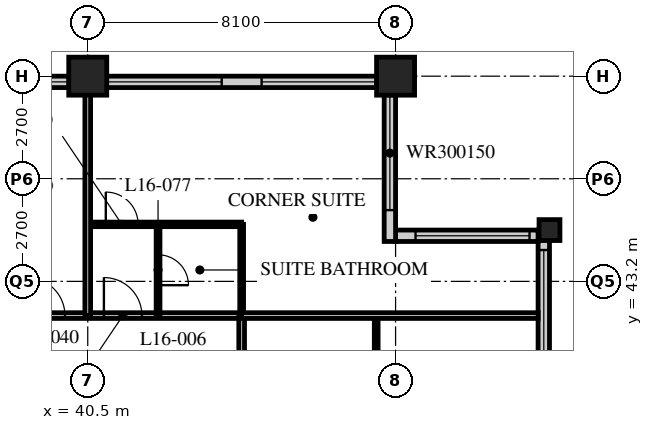
"""IFC4 building model, lengths in metres.
Left out: names, types, materials, properties, quantities, classifications, styles, units other than length and angle.
Written with IfcOpenShell. Run it as: python <this file> out.ifc"""

import sys

from ifc_helpers import new_model, si_unit, direction, frame, frame_2d, origin, origin_2d, place, context, subcontext, project, spatial, rectangle, hollow_rectangle, extrude, element, fill, save


model = new_model("IFC4")
c1 = context("Model", 3, precision=1e-05, world=origin(), true_north=direction((0.0, 1.0)))
c2 = subcontext(c1, "Body", "Model", "MODEL_VIEW")
j1 = project(units=[si_unit("LENGTHUNIT", "METRE"), si_unit("PLANEANGLEUNIT", "RADIAN")], contexts=[c1])
p1 = place(None, origin())
s1 = spatial("IfcSite", under=j1, at=p1, CompositionType="ELEMENT")
p2 = place(p1, origin())
s2 = spatial("IfcBuilding", under=s1, at=p2, CompositionType="ELEMENT")
p3 = place(p2, frame((0.0, 0.0, 67.0)))
s3 = spatial("IfcBuildingStorey", under=s2, at=p3, CompositionType="ELEMENT", Elevation=67.0)
for number, where, z_axis, x_axis in (
    (1, (40.5, 48.6, 0.0), (0.0, 0.0, 1.0), (1.0, 0.0, 0.0)),
    (2, (48.6, 48.6, 0.0), (0.0, 0.0, 1.0), (1.0, 0.0, 0.0)),
):
    element("IfcColumn", number, at=place(p3, frame(where, z_axis=z_axis, x_axis=x_axis)), inside=s3, PredefinedType="COLUMN", context=c2, shape_type="SweptSolid", body=[
        extrude(hollow_rectangle(XDim=1.0, YDim=1.0, WallThickness=0.1, at=origin_2d()), origin(), (0.0, 0.0, 1.0), 3.4),
    ])
p4 = place(p3, frame((52.65, 44.55, 0.0), z_axis=(0.0, 0.0, 1.0), x_axis=(1.0, 0.0, 0.0)))
e3 = element("IfcColumn", 3, at=p4, inside=s3, PredefinedType="COLUMN", context=c2, shape_type="SweptSolid", body=[
    extrude(hollow_rectangle(XDim=0.55, YDim=0.55, WallThickness=0.05, at=origin_2d()), origin(), (0.0, 0.0, 1.0), 3.4),
])
p5 = place(p3, frame((52.5, 40.2, 0.0), z_axis=(0.0, 0.0, 1.0), x_axis=(0.0, 1.0, 0.0)))
e4 = element("IfcWall", 4, at=p5, inside=s3, PredefinedType="SOLIDWALL", context=c2, shape_type="SweptSolid", body=[
    extrude(rectangle(XDim=4.35, YDim=0.3, at=frame_2d((2.175, 0.0))), origin(), (0.0, 0.0, 1.0), 3.19),
])
p6 = place(p5, frame((0.825, 0.0, 0.9)))
e5 = element("IfcOpeningElement", 5, at=p6, cuts=e4, PredefinedType="OPENING", context=c2, shape_type="SweptSolid", body=[
    extrude(rectangle(XDim=3.0, YDim=1.5, at=frame_2d((1.5, 0.75))), frame((0.0, 0.16, 0.0), z_axis=(0.0, -1.0, 0.0), x_axis=(1.0, 0.0, 0.0)), (0.0, 0.0, 1.0), 0.32),
])
p7 = place(p3, frame((52.35, 44.4, 0.0), z_axis=(0.0, 0.0, 1.0), x_axis=(-1.0, 0.0, 0.0)))
e6 = element("IfcWall", 6, at=p7, inside=s3, PredefinedType="SOLIDWALL", context=c2, shape_type="SweptSolid", body=[
    extrude(rectangle(XDim=3.75, YDim=0.3, at=frame_2d((1.875, 0.0))), origin(), (0.0, 0.0, 1.0), 3.19),
])
p8 = place(p7, frame((0.225, 0.0, 0.9)))
e7 = element("IfcOpeningElement", 7, at=p8, cuts=e6, PredefinedType="OPENING", context=c2, shape_type="SweptSolid", body=[
    extrude(rectangle(XDim=3.0, YDim=1.5, at=frame_2d((1.5, 0.75))), frame((0.0, 0.16, 0.0), z_axis=(0.0, -1.0, 0.0), x_axis=(1.0, 0.0, 0.0)), (0.0, 0.0, 1.0), 0.32),
])
p9 = place(p3, frame((48.45, 44.25, 0.0), z_axis=(0.0, 0.0, 1.0), x_axis=(0.0, 1.0, 0.0)))
e8 = element("IfcWall", 8, at=p9, inside=s3, PredefinedType="SOLIDWALL", context=c2, shape_type="SweptSolid", body=[
    extrude(rectangle(XDim=4.35, YDim=0.3, at=frame_2d((2.175, 0.0))), origin(), (0.0, 0.0, 1.0), 3.19),
])
p10 = place(p9, frame((0.825, 0.0, 0.9)))
e9 = element("IfcOpeningElement", 9, at=p10, cuts=e8, PredefinedType="OPENING", context=c2, shape_type="SweptSolid", body=[
    extrude(rectangle(XDim=3.0, YDim=1.5, at=frame_2d((1.5, 0.75))), frame((0.0, 0.16, 0.0), z_axis=(0.0, -1.0, 0.0), x_axis=(1.0, 0.0, 0.0)), (0.0, 0.0, 1.0), 0.32),
])
p11 = place(p3, frame((48.3, 48.45, 0.0), z_axis=(0.0, 0.0, 1.0), x_axis=(-1.0, 0.0, 0.0)))
e10 = element("IfcWall", 10, at=p11, inside=s3, PredefinedType="SOLIDWALL", context=c2, shape_type="SweptSolid", body=[
    extrude(rectangle(XDim=40.2, YDim=0.3, at=frame_2d((20.1, 0.0))), origin(), (0.0, 0.0, 1.0), 3.19),
])
p12 = place(p11, frame((0.225, 0.0, 0.9)))
e11 = element("IfcOpeningElement", 11, at=p12, cuts=e10, PredefinedType="OPENING", context=c2, shape_type="SweptSolid", body=[
    extrude(rectangle(XDim=3.0, YDim=2.0, at=frame_2d((1.5, 1.0))), frame((0.0, 0.16, 0.0), z_axis=(0.0, -1.0, 0.0), x_axis=(1.0, 0.0, 0.0)), (0.0, 0.0, 1.0), 0.32),
])
p13 = place(p11, frame((4.275, 0.0, 0.9)))
e12 = element("IfcOpeningElement", 12, at=p13, cuts=e10, PredefinedType="OPENING", context=c2, shape_type="SweptSolid", body=[
    extrude(rectangle(XDim=3.0, YDim=2.0, at=frame_2d((1.5, 1.0))), frame((0.0, 0.16, 0.0), z_axis=(0.0, -1.0, 0.0), x_axis=(1.0, 0.0, 0.0)), (0.0, 0.0, 1.0), 0.32),
])
p14 = place(p11, frame((8.325, 0.0, 0.9)))
e13 = element("IfcOpeningElement", 13, at=p14, cuts=e10, PredefinedType="OPENING", context=c2, shape_type="SweptSolid", body=[
    extrude(rectangle(XDim=3.0, YDim=2.0, at=frame_2d((1.5, 1.0))), frame((0.0, 0.16, 0.0), z_axis=(0.0, -1.0, 0.0), x_axis=(1.0, 0.0, 0.0)), (0.0, 0.0, 1.0), 0.32),
])
p15 = place(p11, frame((12.375, 0.0, 0.9)))
e14 = element("IfcOpeningElement", 14, at=p15, cuts=e10, PredefinedType="OPENING", context=c2, shape_type="SweptSolid", body=[
    extrude(rectangle(XDim=3.0, YDim=2.0, at=frame_2d((1.5, 1.0))), frame((0.0, 0.16, 0.0), z_axis=(0.0, -1.0, 0.0), x_axis=(1.0, 0.0, 0.0)), (0.0, 0.0, 1.0), 0.32),
])
p16 = place(p11, frame((16.425, 0.0, 0.9)))
e15 = element("IfcOpeningElement", 15, at=p16, cuts=e10, PredefinedType="OPENING", context=c2, shape_type="SweptSolid", body=[
    extrude(rectangle(XDim=3.0, YDim=2.0, at=frame_2d((1.5, 1.0))), frame((0.0, 0.16, 0.0), z_axis=(0.0, -1.0, 0.0), x_axis=(1.0, 0.0, 0.0)), (0.0, 0.0, 1.0), 0.32),
])
p17 = place(p11, frame((20.475, 0.0, 0.9)))
e16 = element("IfcOpeningElement", 16, at=p17, cuts=e10, PredefinedType="OPENING", context=c2, shape_type="SweptSolid", body=[
    extrude(rectangle(XDim=3.0, YDim=2.0, at=frame_2d((1.5, 1.0))), frame((0.0, 0.16, 0.0), z_axis=(0.0, -1.0, 0.0), x_axis=(1.0, 0.0, 0.0)), (0.0, 0.0, 1.0), 0.32),
])
p18 = place(p11, frame((24.525, 0.0, 0.9)))
e17 = element("IfcOpeningElement", 17, at=p18, cuts=e10, PredefinedType="OPENING", context=c2, shape_type="SweptSolid", body=[
    extrude(rectangle(XDim=3.0, YDim=2.0, at=frame_2d((1.5, 1.0))), frame((0.0, 0.16, 0.0), z_axis=(0.0, -1.0, 0.0), x_axis=(1.0, 0.0, 0.0)), (0.0, 0.0, 1.0), 0.32),
])
p19 = place(p11, frame((28.575, 0.0, 0.9)))
e18 = element("IfcOpeningElement", 18, at=p19, cuts=e10, PredefinedType="OPENING", context=c2, shape_type="SweptSolid", body=[
    extrude(rectangle(XDim=3.0, YDim=2.0, at=frame_2d((1.5, 1.0))), frame((0.0, 0.16, 0.0), z_axis=(0.0, -1.0, 0.0), x_axis=(1.0, 0.0, 0.0)), (0.0, 0.0, 1.0), 0.32),
])
p20 = place(p11, frame((32.625, 0.0, 0.9)))
e19 = element("IfcOpeningElement", 19, at=p20, cuts=e10, PredefinedType="OPENING", context=c2, shape_type="SweptSolid", body=[
    extrude(rectangle(XDim=3.0, YDim=2.0, at=frame_2d((1.5, 1.0))), frame((0.0, 0.16, 0.0), z_axis=(0.0, -1.0, 0.0), x_axis=(1.0, 0.0, 0.0)), (0.0, 0.0, 1.0), 0.32),
])
p21 = place(p11, frame((36.675, 0.0, 0.9)))
e20 = element("IfcOpeningElement", 20, at=p21, cuts=e10, PredefinedType="OPENING", context=c2, shape_type="SweptSolid", body=[
    extrude(rectangle(XDim=3.0, YDim=2.0, at=frame_2d((1.5, 1.0))), frame((0.0, 0.16, 0.0), z_axis=(0.0, -1.0, 0.0), x_axis=(1.0, 0.0, 0.0)), (0.0, 0.0, 1.0), 0.32),
])
p22 = place(p3, frame((8.1, 42.3, 0.0), z_axis=(0.0, 0.0, 1.0), x_axis=(1.0, 0.0, 0.0)))
e21 = element("IfcWall", 21, at=p22, inside=s3, PredefinedType="PARTITIONING", context=c2, shape_type="SweptSolid", body=[
    extrude(rectangle(XDim=36.45, YDim=0.15, at=frame_2d((18.225, 0.0))), origin(), (0.0, 0.0, 1.0), 3.19),
])
p23 = place(p22, frame((9.5, 0.0, 0.0)))
e22 = element("IfcOpeningElement", 22, at=p23, cuts=e21, PredefinedType="OPENING", context=c2, shape_type="SweptSolid", body=[
    extrude(rectangle(XDim=1.0, YDim=2.1, at=frame_2d((0.5, 1.05))), frame((0.0, 0.085, 0.0), z_axis=(0.0, -1.0, 0.0), x_axis=(1.0, 0.0, 0.0)), (0.0, 0.0, 1.0), 0.17),
])
p24 = place(p22, frame((14.6, 0.0, 0.0)))
e23 = element("IfcOpeningElement", 23, at=p24, cuts=e21, PredefinedType="OPENING", context=c2, shape_type="SweptSolid", body=[
    extrude(rectangle(XDim=1.0, YDim=2.1, at=frame_2d((0.5, 1.05))), frame((0.0, 0.085, 0.0), z_axis=(0.0, -1.0, 0.0), x_axis=(1.0, 0.0, 0.0)), (0.0, 0.0, 1.0), 0.17),
])
p25 = place(p22, frame((18.65, 0.0, 0.0)))
e24 = element("IfcOpeningElement", 24, at=p25, cuts=e21, PredefinedType="OPENING", context=c2, shape_type="SweptSolid", body=[
    extrude(rectangle(XDim=1.0, YDim=2.1, at=frame_2d((0.5, 1.05))), frame((0.0, 0.085, 0.0), z_axis=(0.0, -1.0, 0.0), x_axis=(1.0, 0.0, 0.0)), (0.0, 0.0, 1.0), 0.17),
])
p26 = place(p22, frame((25.7, 0.0, 0.0)))
e25 = element("IfcOpeningElement", 25, at=p26, cuts=e21, PredefinedType="OPENING", context=c2, shape_type="SweptSolid", body=[
    extrude(rectangle(XDim=1.0, YDim=2.1, at=frame_2d((0.5, 1.05))), frame((0.0, 0.085, 0.0), z_axis=(0.0, -1.0, 0.0), x_axis=(1.0, 0.0, 0.0)), (0.0, 0.0, 1.0), 0.17),
])
p27 = place(p22, frame((30.8, 0.0, 0.0)))
e26 = element("IfcOpeningElement", 26, at=p27, cuts=e21, PredefinedType="OPENING", context=c2, shape_type="SweptSolid", body=[
    extrude(rectangle(XDim=1.0, YDim=2.1, at=frame_2d((0.5, 1.05))), frame((0.0, 0.085, 0.0), z_axis=(0.0, -1.0, 0.0), x_axis=(1.0, 0.0, 0.0)), (0.0, 0.0, 1.0), 0.17),
])
p28 = place(p22, frame((32.825, 0.0, 0.0)))
e27 = element("IfcOpeningElement", 27, at=p28, cuts=e21, PredefinedType="OPENING", context=c2, shape_type="SweptSolid", body=[
    extrude(rectangle(XDim=1.0, YDim=2.1, at=frame_2d((0.5, 1.05))), frame((0.0, 0.085, 0.0), z_axis=(0.0, -1.0, 0.0), x_axis=(1.0, 0.0, 0.0)), (0.0, 0.0, 1.0), 0.17),
])
p29 = place(p22, frame((2.625, 0.0, 0.0)))
e28 = element("IfcOpeningElement", 28, at=p29, cuts=e21, PredefinedType="OPENING", context=c2, shape_type="SweptSolid", body=[
    extrude(rectangle(XDim=1.0, YDim=2.1, at=frame_2d((0.5, 1.05))), frame((0.0, 0.085, 0.0), z_axis=(0.0, -1.0, 0.0), x_axis=(1.0, 0.0, 0.0)), (0.0, 0.0, 1.0), 0.17),
])
p30 = place(p3, frame((44.55, 12.15, 0.0), z_axis=(0.0, 0.0, 1.0), x_axis=(0.0, 1.0, 0.0)))
e29 = element("IfcWall", 29, at=p30, inside=s3, PredefinedType="PARTITIONING", context=c2, shape_type="SweptSolid", body=[
    extrude(rectangle(XDim=30.15, YDim=0.15, at=frame_2d((15.075, 0.0))), origin(), (0.0, 0.0, 1.0), 3.19),
])
p31 = place(p30, frame((2.45, 0.0, 0.0)))
e30 = element("IfcOpeningElement", 30, at=p31, cuts=e29, PredefinedType="OPENING", context=c2, shape_type="SweptSolid", body=[
    extrude(rectangle(XDim=1.0, YDim=2.1, at=frame_2d((0.5, 1.05))), frame((0.0, 0.085, 0.0), z_axis=(0.0, -1.0, 0.0), x_axis=(1.0, 0.0, 0.0)), (0.0, 0.0, 1.0), 0.17),
])
p32 = place(p30, frame((4.35, 0.0, 0.0)))
e31 = element("IfcOpeningElement", 31, at=p32, cuts=e29, PredefinedType="OPENING", context=c2, shape_type="SweptSolid", body=[
    extrude(rectangle(XDim=1.0, YDim=2.1, at=frame_2d((0.5, 1.05))), frame((0.0, 0.085, 0.0), z_axis=(0.0, -1.0, 0.0), x_axis=(1.0, 0.0, 0.0)), (0.0, 0.0, 1.0), 0.17),
])
p33 = place(p30, frame((8.4, 0.0, 0.0)))
e32 = element("IfcOpeningElement", 32, at=p33, cuts=e29, PredefinedType="OPENING", context=c2, shape_type="SweptSolid", body=[
    extrude(rectangle(XDim=1.0, YDim=2.1, at=frame_2d((0.5, 1.05))), frame((0.0, 0.085, 0.0), z_axis=(0.0, -1.0, 0.0), x_axis=(1.0, 0.0, 0.0)), (0.0, 0.0, 1.0), 0.17),
])
p34 = place(p30, frame((14.6, 0.0, 0.0)))
e33 = element("IfcOpeningElement", 33, at=p34, cuts=e29, PredefinedType="OPENING", context=c2, shape_type="SweptSolid", body=[
    extrude(rectangle(XDim=1.0, YDim=2.1, at=frame_2d((0.5, 1.05))), frame((0.0, 0.085, 0.0), z_axis=(0.0, -1.0, 0.0), x_axis=(1.0, 0.0, 0.0)), (0.0, 0.0, 1.0), 0.17),
])
p35 = place(p30, frame((21.65, 0.0, 0.0)))
e34 = element("IfcOpeningElement", 34, at=p35, cuts=e29, PredefinedType="OPENING", context=c2, shape_type="SweptSolid", body=[
    extrude(rectangle(XDim=1.0, YDim=2.1, at=frame_2d((0.5, 1.05))), frame((0.0, 0.085, 0.0), z_axis=(0.0, -1.0, 0.0), x_axis=(1.0, 0.0, 0.0)), (0.0, 0.0, 1.0), 0.17),
])
p36 = place(p30, frame((26.7, 0.0, 0.0)))
e35 = element("IfcOpeningElement", 35, at=p36, cuts=e29, PredefinedType="OPENING", context=c2, shape_type="SweptSolid", body=[
    extrude(rectangle(XDim=1.0, YDim=2.1, at=frame_2d((0.5, 1.05))), frame((0.0, 0.085, 0.0), z_axis=(0.0, -1.0, 0.0), x_axis=(1.0, 0.0, 0.0)), (0.0, 0.0, 1.0), 0.17),
])
p37 = place(p3, frame((48.09, 40.0, 0.0), z_axis=(0.0, 0.0, 1.0), x_axis=(0.0, 1.0, 0.0)))
e36 = element("IfcWall", 36, at=p37, inside=s3, PredefinedType="PARTITIONING", context=c2, shape_type="SweptSolid", body=[
    extrude(rectangle(XDim=2.3, YDim=0.1, at=frame_2d((1.15, 0.0))), origin(), (0.0, 0.0, 1.0), 3.19),
])
p38 = place(p3, frame((40.5, 44.7, 0.0), z_axis=(0.0, 0.0, 1.0), x_axis=(1.0, 0.0, 0.0)))
e37 = element("IfcWall", 37, at=p38, inside=s3, PredefinedType="PARTITIONING", context=c2, shape_type="SweptSolid", body=[
    extrude(rectangle(XDim=4.05, YDim=0.12, at=frame_2d((2.025, 0.0))), origin(), (0.0, 0.0, 1.0), 3.19),
])
p39 = place(p38, frame((0.475, 0.0, 0.0)))
e38 = element("IfcOpeningElement", 38, at=p39, cuts=e37, PredefinedType="OPENING", context=c2, shape_type="SweptSolid", body=[
    extrude(rectangle(XDim=0.85, YDim=2.1, at=frame_2d((0.425, 1.05))), frame((0.0, 0.07, 0.0), z_axis=(0.0, -1.0, 0.0), x_axis=(1.0, 0.0, 0.0)), (0.0, 0.0, 1.0), 0.14),
])
p40 = place(p3, frame((42.35, 42.3, 0.0), z_axis=(0.0, 0.0, 1.0), x_axis=(0.0, 1.0, 0.0)))
e39 = element("IfcWall", 39, at=p40, inside=s3, PredefinedType="PARTITIONING", context=c2, shape_type="SweptSolid", body=[
    extrude(rectangle(XDim=2.4, YDim=0.1, at=frame_2d((1.2, 0.0))), origin(), (0.0, 0.0, 1.0), 3.19),
])
p41 = place(p40, frame((0.8, 0.0, 0.0)))
e40 = element("IfcOpeningElement", 40, at=p41, cuts=e39, PredefinedType="OPENING", context=c2, shape_type="SweptSolid", body=[
    extrude(rectangle(XDim=0.8, YDim=2.1, at=frame_2d((0.4, 1.05))), frame((0.0, 0.06, 0.0), z_axis=(0.0, -1.0, 0.0), x_axis=(1.0, 0.0, 0.0)), (0.0, 0.0, 1.0), 0.12),
])
p42 = place(p3, frame((44.55, 42.3, 0.0), z_axis=(0.0, 0.0, 1.0), x_axis=(0.0, 1.0, 0.0)))
e41 = element("IfcWall", 41, at=p42, inside=s3, PredefinedType="PARTITIONING", context=c2, shape_type="SweptSolid", body=[
    extrude(rectangle(XDim=2.4, YDim=0.1, at=frame_2d((1.2, 0.0))), origin(), (0.0, 0.0, 1.0), 3.19),
])
p43 = place(p3, frame((44.55, 42.3, 0.0), z_axis=(0.0, 0.0, 1.0), x_axis=(1.0, 0.0, 0.0)))
e42 = element("IfcWall", 42, at=p43, inside=s3, PredefinedType="PARTITIONING", context=c2, shape_type="SweptSolid", body=[
    extrude(rectangle(XDim=7.8, YDim=0.15, at=frame_2d((3.9, 0.0))), origin(), (0.0, 0.0, 1.0), 3.19),
])
p44 = place(p3, frame((40.5, 42.3, 0.0), z_axis=(0.0, 0.0, 1.0), x_axis=(0.0, 1.0, 0.0)))
e43 = element("IfcWall", 43, at=p44, inside=s3, PredefinedType="PARTITIONING", context=c2, shape_type="SweptSolid", body=[
    extrude(rectangle(XDim=6.0, YDim=0.15, at=frame_2d((3.0, 0.0))), origin(), (0.0, 0.0, 1.0), 2.578),
])
p45 = place(p6, origin())
e44 = element("IfcWindow", 44, at=p45, inside=s3, PartitioningType="SINGLE_PANEL", PredefinedType="WINDOW", context=c2, shape_type="SweptSolid", body=[
    extrude(rectangle(XDim=3.0, YDim=1.5, at=frame_2d((1.5, 0.75))), frame((0.0, 0.03, 0.0), z_axis=(0.0, -1.0, 0.0), x_axis=(1.0, 0.0, 0.0)), (0.0, 0.0, 1.0), 0.06),
])
fill(e5, e44)
p46 = place(p8, origin())
e45 = element("IfcWindow", 45, at=p46, inside=s3, PartitioningType="SINGLE_PANEL", PredefinedType="WINDOW", context=c2, shape_type="SweptSolid", body=[
    extrude(rectangle(XDim=3.0, YDim=1.5, at=frame_2d((1.5, 0.75))), frame((0.0, 0.03, 0.0), z_axis=(0.0, -1.0, 0.0), x_axis=(1.0, 0.0, 0.0)), (0.0, 0.0, 1.0), 0.06),
])
fill(e7, e45)
p47 = place(p10, origin())
e46 = element("IfcWindow", 46, at=p47, inside=s3, PartitioningType="SINGLE_PANEL", PredefinedType="WINDOW", context=c2, shape_type="SweptSolid", body=[
    extrude(rectangle(XDim=3.0, YDim=1.5, at=frame_2d((1.5, 0.75))), frame((0.0, 0.03, 0.0), z_axis=(0.0, -1.0, 0.0), x_axis=(1.0, 0.0, 0.0)), (0.0, 0.0, 1.0), 0.06),
])
fill(e9, e46)
p48 = place(p12, origin())
e47 = element("IfcWindow", 47, at=p48, inside=s3, PartitioningType="SINGLE_PANEL", PredefinedType="WINDOW", context=c2, shape_type="SweptSolid", body=[
    extrude(rectangle(XDim=3.0, YDim=2.0, at=frame_2d((1.5, 1.0))), frame((0.0, 0.03, 0.0), z_axis=(0.0, -1.0, 0.0), x_axis=(1.0, 0.0, 0.0)), (0.0, 0.0, 1.0), 0.06),
])
fill(e11, e47)
p49 = place(p13, origin())
e48 = element("IfcWindow", 48, at=p49, inside=s3, PartitioningType="SINGLE_PANEL", PredefinedType="WINDOW", context=c2, shape_type="SweptSolid", body=[
    extrude(rectangle(XDim=3.0, YDim=2.0, at=frame_2d((1.5, 1.0))), frame((0.0, 0.03, 0.0), z_axis=(0.0, -1.0, 0.0), x_axis=(1.0, 0.0, 0.0)), (0.0, 0.0, 1.0), 0.06),
])
fill(e12, e48)
p50 = place(p14, origin())
e49 = element("IfcWindow", 49, at=p50, inside=s3, PartitioningType="SINGLE_PANEL", PredefinedType="WINDOW", context=c2, shape_type="SweptSolid", body=[
    extrude(rectangle(XDim=3.0, YDim=2.0, at=frame_2d((1.5, 1.0))), frame((0.0, 0.03, 0.0), z_axis=(0.0, -1.0, 0.0), x_axis=(1.0, 0.0, 0.0)), (0.0, 0.0, 1.0), 0.06),
])
fill(e13, e49)
p51 = place(p27, origin())
e50 = element("IfcDoor", 50, at=p51, inside=s3, OperationType="SINGLE_SWING_LEFT", PredefinedType="DOOR", context=c2, shape_type="SweptSolid", body=[
    extrude(rectangle(XDim=1.0, YDim=2.1, at=frame_2d((0.5, 1.05))), frame((0.0, 0.025, 0.0), z_axis=(0.0, -1.0, 0.0), x_axis=(1.0, 0.0, 0.0)), (0.0, 0.0, 1.0), 0.05),
])
fill(e26, e50)
p52 = place(p41, origin())
e51 = element("IfcDoor", 51, at=p52, inside=s3, OperationType="SINGLE_SWING_RIGHT", PredefinedType="DOOR", context=c2, shape_type="SweptSolid", body=[
    extrude(rectangle(XDim=0.8, YDim=2.1, at=frame_2d((0.4, 1.05))), frame((0.0, 0.025, 0.0), z_axis=(0.0, -1.0, 0.0), x_axis=(1.0, 0.0, 0.0)), (0.0, 0.0, 1.0), 0.05),
])
fill(e40, e51)
p53 = place(p28, origin())
e52 = element("IfcDoor", 52, at=p53, inside=s3, OperationType="SINGLE_SWING_LEFT", PredefinedType="DOOR", context=c2, shape_type="SweptSolid", body=[
    extrude(rectangle(XDim=1.0, YDim=2.1, at=frame_2d((0.5, 1.05))), frame((0.0, 0.025, 0.0), z_axis=(0.0, -1.0, 0.0), x_axis=(1.0, 0.0, 0.0)), (0.0, 0.0, 1.0), 0.05),
])
fill(e27, e52)
p54 = place(p39, origin())
e53 = element("IfcDoor", 53, at=p54, inside=s3, OperationType="SINGLE_SWING_LEFT", PredefinedType="DOOR", context=c2, shape_type="SweptSolid", body=[
    extrude(rectangle(XDim=0.85, YDim=2.1, at=frame_2d((0.425, 1.05))), frame((0.0, 0.025, 0.0), z_axis=(0.0, -1.0, 0.0), x_axis=(1.0, 0.0, 0.0)), (0.0, 0.0, 1.0), 0.05),
])
fill(e38, e53)
save(model, sys.argv[1])
